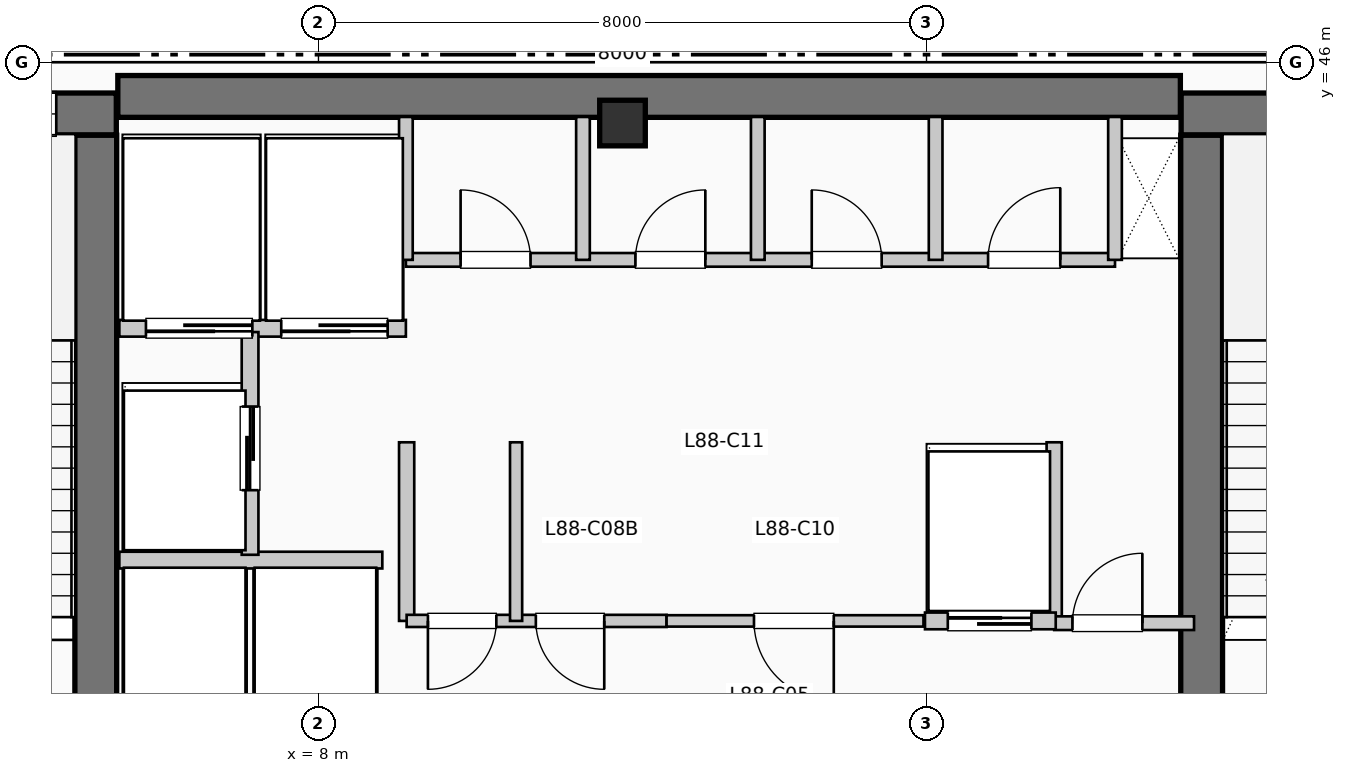
"""IFC4 building model, lengths in metres.
Left out: names, types, materials, properties, quantities, classifications, styles, units other than length and angle.
Written with IfcOpenShell. Run it as: python <this file> out.ifc"""

import sys

from ifc_helpers import new_model, si_unit, direction, frame, frame_2d, origin, origin_2d, place, context, subcontext, project, spatial, rectangle, extrude, element, fill, save


model = new_model("IFC4")
c1 = context("Model", 3, precision=1e-05, world=origin(), true_north=direction((0.0, 1.0)))
c2 = subcontext(c1, "Body", "Model", "MODEL_VIEW")
j1 = project(units=[si_unit("LENGTHUNIT", "METRE"), si_unit("PLANEANGLEUNIT", "RADIAN")], contexts=[c1])
p1 = place(None, origin())
s1 = spatial("IfcSite", under=j1, at=p1, CompositionType="ELEMENT")
p2 = place(p1, origin())
s2 = spatial("IfcBuilding", under=s1, at=p2, CompositionType="ELEMENT")
p3 = place(p2, frame((0.0, 0.0, 361.35)))
s3 = spatial("IfcBuildingStorey", under=s2, at=p3, CompositionType="ELEMENT", Elevation=361.35)
p4 = place(p3, frame((5.36, 45.55, 0.0), z_axis=(0.0, 0.0, 1.0), x_axis=(1.0, 0.0, 0.0)))
e1 = element("IfcWall", 1, at=p4, inside=s3, PredefinedType="SHEAR", context=c2, shape_type="SweptSolid", body=[
    extrude(rectangle(XDim=13.98, YDim=0.55, at=frame_2d((6.99, 0.0))), origin(), (0.0, 0.0, 1.0), 4.62),
])
p5 = place(p3, frame((5.07, 37.15, 0.0), z_axis=(0.0, 0.0, 1.0), x_axis=(0.0, 1.0, 0.0)))
e2 = element("IfcWall", 2, at=p5, inside=s3, PredefinedType="SHEAR", context=c2, shape_type="SweptSolid", body=[
    extrude(rectangle(XDim=7.89, YDim=0.55, at=frame_2d((3.945, 0.0))), origin(), (0.0, 0.0, 1.0), 4.62),
])
p6 = place(p3, frame((1.1, 45.32, 0.0), z_axis=(0.0, 0.0, 1.0), x_axis=(1.0, 0.0, 0.0)))
e3 = element("IfcWall", 3, at=p6, inside=s3, PredefinedType="SHEAR", context=c2, shape_type="SweptSolid", body=[
    extrude(rectangle(XDim=4.24, YDim=0.55, at=frame_2d((2.12, 0.0))), origin(), (0.0, 0.0, 1.0), 4.62),
])
p7 = place(p6, frame((2.05, 0.0, 1.05)))
e4 = element("IfcOpeningElement", 4, at=p7, cuts=e3, PredefinedType="OPENING", context=c2, shape_type="SweptSolid", body=[
    extrude(rectangle(XDim=1.4, YDim=1.8, at=frame_2d((0.7, 0.9))), frame((0.0, 0.285, 0.0), z_axis=(0.0, -1.0, 0.0), x_axis=(1.0, 0.0, 0.0)), (0.0, 0.0, 1.0), 0.57),
])
p8 = place(p3, frame((19.62, 37.15, 0.0), z_axis=(0.0, 0.0, 1.0), x_axis=(0.0, 1.0, 0.0)))
e5 = element("IfcWall", 5, at=p8, inside=s3, PredefinedType="SHEAR", context=c2, shape_type="SweptSolid", body=[
    extrude(rectangle(XDim=7.89, YDim=0.55, at=frame_2d((3.945, 0.0))), origin(), (0.0, 0.0, 1.0), 4.62),
])
p9 = place(p3, frame((19.35, 45.32, 0.0), z_axis=(0.0, 0.0, 1.0), x_axis=(1.0, 0.0, 0.0)))
e6 = element("IfcWall", 6, at=p9, inside=s3, PredefinedType="SHEAR", context=c2, shape_type="SweptSolid", body=[
    extrude(rectangle(XDim=3.69, YDim=0.55, at=frame_2d((1.845, 0.0))), origin(), (0.0, 0.0, 1.0), 4.62),
])
p10 = place(p9, frame((1.15, 0.0, 1.05)))
e7 = element("IfcOpeningElement", 7, at=p10, cuts=e6, PredefinedType="OPENING", context=c2, shape_type="SweptSolid", body=[
    extrude(rectangle(XDim=1.4, YDim=1.8, at=frame_2d((0.7, 0.9))), frame((0.0, 0.285, 0.0), z_axis=(0.0, -1.0, 0.0), x_axis=(1.0, 0.0, 0.0)), (0.0, 0.0, 1.0), 0.57),
])
p11 = place(p3, frame((12.0, 45.2, 0.0), z_axis=(0.0, 0.0, 1.0), x_axis=(1.0, 0.0, 0.0)))
e8 = element("IfcColumn", 8, at=p11, inside=s3, PredefinedType="COLUMN", context=c2, shape_type="SweptSolid", body=[
    extrude(rectangle(XDim=0.6, YDim=0.6, at=origin_2d()), origin(), (0.0, 0.0, 1.0), 4.62),
])
p12 = place(p3, frame((5.38, 39.45, 0.0), z_axis=(0.0, 0.0, 1.0), x_axis=(1.0, 0.0, 0.0)))
e9 = element("IfcWall", 9, at=p12, inside=s3, PredefinedType="PARTITIONING", context=c2, shape_type="SweptSolid", body=[
    extrude(rectangle(XDim=3.46, YDim=0.22, at=frame_2d((1.73, 0.0))), origin(), (0.0, 0.0, 1.0), 4.27),
])
p13 = place(p3, frame((5.38, 42.5, 0.0), z_axis=(0.0, 0.0, 1.0), x_axis=(1.0, 0.0, 0.0)))
e10 = element("IfcWall", 10, at=p13, inside=s3, PredefinedType="PARTITIONING", context=c2, shape_type="SweptSolid", body=[
    extrude(rectangle(XDim=3.77, YDim=0.22, at=frame_2d((1.885, 0.0))), origin(), (0.0, 0.0, 1.0), 4.27),
])
p14 = place(p13, frame((1.75, 0.0, 0.0), z_axis=(0.0, 0.0, 1.0), x_axis=(-1.0, 0.0, 0.0)))
e11 = element("IfcOpeningElement", 11, at=p14, cuts=e10, PredefinedType="OPENING", context=c2, shape_type="SweptSolid", body=[
    extrude(rectangle(XDim=1.4, YDim=2.2, at=frame_2d((0.7, 1.1))), frame((0.0, 0.12, 0.0), z_axis=(0.0, -1.0, 0.0), x_axis=(1.0, 0.0, 0.0)), (0.0, 0.0, 1.0), 0.24),
])
p15 = place(p13, frame((3.53, 0.0, 0.0), z_axis=(0.0, 0.0, 1.0), x_axis=(-1.0, 0.0, 0.0)))
e12 = element("IfcOpeningElement", 12, at=p15, cuts=e10, PredefinedType="OPENING", context=c2, shape_type="SweptSolid", body=[
    extrude(rectangle(XDim=1.4, YDim=2.2, at=frame_2d((0.7, 1.1))), frame((0.0, 0.12, 0.0), z_axis=(0.0, -1.0, 0.0), x_axis=(1.0, 0.0, 0.0)), (0.0, 0.0, 1.0), 0.24),
])
p16 = place(p3, frame((7.1, 39.52, 0.0), z_axis=(0.0, 0.0, 1.0), x_axis=(0.0, 1.0, 0.0)))
e13 = element("IfcWall", 13, at=p16, inside=s3, PredefinedType="PARTITIONING", context=c2, shape_type="SweptSolid", body=[
    extrude(rectangle(XDim=2.93, YDim=0.22, at=frame_2d((1.465, 0.0))), origin(), (0.0, 0.0, 1.0), 4.27),
])
p17 = place(p16, frame((0.85, 0.0, 0.0)))
e14 = element("IfcOpeningElement", 14, at=p17, cuts=e13, PredefinedType="OPENING", context=c2, shape_type="SweptSolid", body=[
    extrude(rectangle(XDim=1.1, YDim=2.2, at=frame_2d((0.55, 1.1))), frame((0.0, 0.12, 0.0), z_axis=(0.0, -1.0, 0.0), x_axis=(1.0, 0.0, 0.0)), (0.0, 0.0, 1.0), 0.24),
])
for number, where, z_axis, x_axis in (
    (15, (9.16, 38.65, 0.0), (0.0, 0.0, 1.0), (0.0, 1.0, 0.0)),
    (16, (17.68, 38.65, 0.0), (0.0, 0.0, 1.0), (0.0, 1.0, 0.0)),
):
    element("IfcWall", number, at=place(p3, frame(where, z_axis=z_axis, x_axis=x_axis)), inside=s3, PredefinedType="PARTITIONING", context=c2, shape_type="SweptSolid", body=[
        extrude(rectangle(XDim=2.35, YDim=0.2, at=frame_2d((1.175, 0.0))), origin(), (0.0, 0.0, 1.0), 4.27),
    ])
p18 = place(p3, frame((17.68, 38.62, 0.0), z_axis=(0.0, 0.0, 1.0), x_axis=(1.0, 0.0, 0.0)))
e17 = element("IfcWall", 17, at=p18, inside=s3, PredefinedType="PARTITIONING", context=c2, shape_type="SweptSolid", body=[
    extrude(rectangle(XDim=1.84, YDim=0.18, at=frame_2d((0.92, 0.0))), origin(), (0.0, 0.0, 1.0), 4.27),
])
p19 = place(p18, frame((0.24, 0.0, 0.0)))
e18 = element("IfcOpeningElement", 18, at=p19, cuts=e17, PredefinedType="OPENING", context=c2, shape_type="SweptSolid", body=[
    extrude(rectangle(XDim=0.92, YDim=2.1, at=frame_2d((0.46, 1.05))), frame((0.0, 0.1, 0.0), z_axis=(0.0, -1.0, 0.0), x_axis=(1.0, 0.0, 0.0)), (0.0, 0.0, 1.0), 0.2),
])
p20 = place(p3, frame((9.16, 38.65, 0.0), z_axis=(0.0, 0.0, 1.0), x_axis=(1.0, 0.0, 0.0)))
e19 = element("IfcWall", 19, at=p20, inside=s3, PredefinedType="PARTITIONING", context=c2, shape_type="SweptSolid", body=[
    extrude(rectangle(XDim=3.42, YDim=0.16, at=frame_2d((1.71, 0.0))), origin(), (0.0, 0.0, 1.0), 4.27),
])
p21 = place(p20, frame((1.18, 0.0, 0.0), z_axis=(0.0, 0.0, 1.0), x_axis=(-1.0, 0.0, 0.0)))
e20 = element("IfcOpeningElement", 20, at=p21, cuts=e19, PredefinedType="OPENING", context=c2, shape_type="SweptSolid", body=[
    extrude(rectangle(XDim=0.9, YDim=2.15, at=frame_2d((0.45, 1.075))), frame((0.0, 0.09, 0.0), z_axis=(0.0, -1.0, 0.0), x_axis=(1.0, 0.0, 0.0)), (0.0, 0.0, 1.0), 0.18),
])
p22 = place(p20, frame((2.6, 0.0, 0.0), z_axis=(0.0, 0.0, 1.0), x_axis=(-1.0, 0.0, 0.0)))
e21 = element("IfcOpeningElement", 21, at=p22, cuts=e19, PredefinedType="OPENING", context=c2, shape_type="SweptSolid", body=[
    extrude(rectangle(XDim=0.9, YDim=2.15, at=frame_2d((0.45, 1.075))), frame((0.0, 0.09, 0.0), z_axis=(0.0, -1.0, 0.0), x_axis=(1.0, 0.0, 0.0)), (0.0, 0.0, 1.0), 0.18),
])
p23 = place(p3, frame((10.6, 38.65, 0.0), z_axis=(0.0, 0.0, 1.0), x_axis=(0.0, 1.0, 0.0)))
e22 = element("IfcWall", 22, at=p23, inside=s3, PredefinedType="PARTITIONING", context=c2, shape_type="SweptSolid", body=[
    extrude(rectangle(XDim=2.35, YDim=0.16, at=frame_2d((1.175, 0.0))), origin(), (0.0, 0.0, 1.0), 4.27),
])
p24 = place(p3, frame((12.58, 38.65, 0.0), z_axis=(0.0, 0.0, 1.0), x_axis=(1.0, 0.0, 0.0)))
e23 = element("IfcWall", 23, at=p24, inside=s3, PredefinedType="PARTITIONING", context=c2, shape_type="SweptSolid", body=[
    extrude(rectangle(XDim=3.38, YDim=0.15, at=frame_2d((1.69, 0.0))), origin(), (0.0, 0.0, 1.0), 4.27),
])
p25 = place(p24, frame((2.2, 0.0, 0.0), z_axis=(0.0, 0.0, 1.0), x_axis=(-1.0, 0.0, 0.0)))
e24 = element("IfcOpeningElement", 24, at=p25, cuts=e23, PredefinedType="OPENING", context=c2, shape_type="SweptSolid", body=[
    extrude(rectangle(XDim=1.05, YDim=2.15, at=frame_2d((0.525, 1.075))), frame((0.0, 0.085, 0.0), z_axis=(0.0, -1.0, 0.0), x_axis=(1.0, 0.0, 0.0)), (0.0, 0.0, 1.0), 0.17),
])
p26 = place(p3, frame((15.98, 38.65, 0.0), z_axis=(0.0, 0.0, 1.0), x_axis=(1.0, 0.0, 0.0)))
e25 = element("IfcWall", 25, at=p26, inside=s3, PredefinedType="PARTITIONING", context=c2, shape_type="SweptSolid", body=[
    extrude(rectangle(XDim=1.72, YDim=0.22, at=frame_2d((0.86, 0.0))), origin(), (0.0, 0.0, 1.0), 4.27),
])
p27 = place(p26, frame((0.3, 0.0, 0.0)))
e26 = element("IfcOpeningElement", 26, at=p27, cuts=e25, PredefinedType="OPENING", context=c2, shape_type="SweptSolid", body=[
    extrude(rectangle(XDim=1.1, YDim=2.2, at=frame_2d((0.55, 1.1))), frame((0.0, 0.12, 0.0), z_axis=(0.0, -1.0, 0.0), x_axis=(1.0, 0.0, 0.0)), (0.0, 0.0, 1.0), 0.24),
])
p28 = place(p3, frame((9.15, 43.4, 0.0), z_axis=(0.0, 0.0, 1.0), x_axis=(1.0, 0.0, 0.0)))
e27 = element("IfcWall", 27, at=p28, inside=s3, PredefinedType="PLUMBINGWALL", context=c2, shape_type="SweptSolid", body=[
    extrude(rectangle(XDim=9.33, YDim=0.18, at=frame_2d((4.665, 0.0))), origin(), (0.0, 0.0, 1.0), 4.27),
])
p29 = place(p28, frame((0.72, 0.0, 0.0)))
e28 = element("IfcOpeningElement", 28, at=p29, cuts=e27, PredefinedType="OPENING", context=c2, shape_type="SweptSolid", body=[
    extrude(rectangle(XDim=0.92, YDim=2.1, at=frame_2d((0.46, 1.05))), frame((0.0, 0.1, 0.0), z_axis=(0.0, -1.0, 0.0), x_axis=(1.0, 0.0, 0.0)), (0.0, 0.0, 1.0), 0.2),
])
p30 = place(p28, frame((3.02, 0.0, 0.0)))
e29 = element("IfcOpeningElement", 29, at=p30, cuts=e27, PredefinedType="OPENING", context=c2, shape_type="SweptSolid", body=[
    extrude(rectangle(XDim=0.92, YDim=2.1, at=frame_2d((0.46, 1.05))), frame((0.0, 0.1, 0.0), z_axis=(0.0, -1.0, 0.0), x_axis=(1.0, 0.0, 0.0)), (0.0, 0.0, 1.0), 0.2),
])
p31 = place(p28, frame((5.34, 0.0, 0.0)))
e30 = element("IfcOpeningElement", 30, at=p31, cuts=e27, PredefinedType="OPENING", context=c2, shape_type="SweptSolid", body=[
    extrude(rectangle(XDim=0.92, YDim=2.1, at=frame_2d((0.46, 1.05))), frame((0.0, 0.1, 0.0), z_axis=(0.0, -1.0, 0.0), x_axis=(1.0, 0.0, 0.0)), (0.0, 0.0, 1.0), 0.2),
])
p32 = place(p28, frame((7.66, 0.0, 0.0)))
e31 = element("IfcOpeningElement", 31, at=p32, cuts=e27, PredefinedType="OPENING", context=c2, shape_type="SweptSolid", body=[
    extrude(rectangle(XDim=0.95, YDim=2.1, at=frame_2d((0.475, 1.05))), frame((0.0, 0.1, 0.0), z_axis=(0.0, -1.0, 0.0), x_axis=(1.0, 0.0, 0.0)), (0.0, 0.0, 1.0), 0.2),
])
for number, where, z_axis, x_axis in (
    (32, (9.15, 43.4, 0.0), (0.0, 0.0, 1.0), (0.0, 1.0, 0.0)),
    (33, (18.48, 43.4, 0.0), (0.0, 0.0, 1.0), (0.0, 1.0, 0.0)),
    (34, (11.48, 43.4, 0.0), (0.0, 0.0, 1.0), (0.0, 1.0, 0.0)),
    (35, (13.78, 43.4, 0.0), (0.0, 0.0, 1.0), (0.0, 1.0, 0.0)),
    (36, (16.12, 43.4, 0.0), (0.0, 0.0, 1.0), (0.0, 1.0, 0.0)),
):
    element("IfcWall", number, at=place(p3, frame(where, z_axis=z_axis, x_axis=x_axis)), inside=s3, PredefinedType="PLUMBINGWALL", context=c2, shape_type="SweptSolid", body=[
        extrude(rectangle(XDim=1.88, YDim=0.18, at=frame_2d((0.94, 0.0))), origin(), (0.0, 0.0, 1.0), 4.27),
    ])
p33 = place(p7, origin())
e37 = element("IfcWindow", 37, at=p33, inside=s3, PartitioningType="SINGLE_PANEL", PredefinedType="WINDOW", context=c2, shape_type="SweptSolid", body=[
    extrude(rectangle(XDim=1.4, YDim=1.8, at=frame_2d((0.7, 0.9))), frame((0.0, 0.03, 0.0), z_axis=(0.0, -1.0, 0.0), x_axis=(1.0, 0.0, 0.0)), (0.0, 0.0, 1.0), 0.06),
])
fill(e4, e37)
p34 = place(p14, origin())
e38 = element("IfcDoor", 38, at=p34, inside=s3, OperationType="SLIDING_TO_LEFT", PredefinedType="DOOR", context=c2, shape_type="SweptSolid", body=[
    extrude(rectangle(XDim=1.4, YDim=2.2, at=frame_2d((0.7, 1.1))), frame((0.0, 0.025, 0.0), z_axis=(0.0, -1.0, 0.0), x_axis=(1.0, 0.0, 0.0)), (0.0, 0.0, 1.0), 0.05),
])
fill(e11, e38)
p35 = place(p15, origin())
e39 = element("IfcDoor", 39, at=p35, inside=s3, OperationType="SLIDING_TO_LEFT", PredefinedType="DOOR", context=c2, shape_type="SweptSolid", body=[
    extrude(rectangle(XDim=1.4, YDim=2.2, at=frame_2d((0.7, 1.1))), frame((0.0, 0.025, 0.0), z_axis=(0.0, -1.0, 0.0), x_axis=(1.0, 0.0, 0.0)), (0.0, 0.0, 1.0), 0.05),
])
fill(e12, e39)
p36 = place(p17, origin())
e40 = element("IfcDoor", 40, at=p36, inside=s3, OperationType="SLIDING_TO_LEFT", PredefinedType="DOOR", context=c2, shape_type="SweptSolid", body=[
    extrude(rectangle(XDim=1.1, YDim=2.2, at=frame_2d((0.55, 1.1))), frame((0.0, 0.025, 0.0), z_axis=(0.0, -1.0, 0.0), x_axis=(1.0, 0.0, 0.0)), (0.0, 0.0, 1.0), 0.05),
])
fill(e14, e40)
p37 = place(p19, origin())
e41 = element("IfcDoor", 41, at=p37, inside=s3, OperationType="SINGLE_SWING_RIGHT", PredefinedType="DOOR", context=c2, shape_type="SweptSolid", body=[
    extrude(rectangle(XDim=0.92, YDim=2.1, at=frame_2d((0.46, 1.05))), frame((0.0, 0.025, 0.0), z_axis=(0.0, -1.0, 0.0), x_axis=(1.0, 0.0, 0.0)), (0.0, 0.0, 1.0), 0.05),
])
fill(e18, e41)
p38 = place(p21, origin())
e42 = element("IfcDoor", 42, at=p38, inside=s3, OperationType="SINGLE_SWING_LEFT", PredefinedType="DOOR", context=c2, shape_type="SweptSolid", body=[
    extrude(rectangle(XDim=0.9, YDim=2.15, at=frame_2d((0.45, 1.075))), frame((0.0, 0.025, 0.0), z_axis=(0.0, -1.0, 0.0), x_axis=(1.0, 0.0, 0.0)), (0.0, 0.0, 1.0), 0.05),
])
fill(e20, e42)
p39 = place(p22, origin())
e43 = element("IfcDoor", 43, at=p39, inside=s3, OperationType="SINGLE_SWING_RIGHT", PredefinedType="DOOR", context=c2, shape_type="SweptSolid", body=[
    extrude(rectangle(XDim=0.9, YDim=2.15, at=frame_2d((0.45, 1.075))), frame((0.0, 0.025, 0.0), z_axis=(0.0, -1.0, 0.0), x_axis=(1.0, 0.0, 0.0)), (0.0, 0.0, 1.0), 0.05),
])
fill(e21, e43)
p40 = place(p25, origin())
e44 = element("IfcDoor", 44, at=p40, inside=s3, OperationType="SINGLE_SWING_RIGHT", PredefinedType="DOOR", context=c2, shape_type="SweptSolid", body=[
    extrude(rectangle(XDim=1.05, YDim=2.15, at=frame_2d((0.525, 1.075))), frame((0.0, 0.025, 0.0), z_axis=(0.0, -1.0, 0.0), x_axis=(1.0, 0.0, 0.0)), (0.0, 0.0, 1.0), 0.05),
])
fill(e24, e44)
p41 = place(p27, origin())
e45 = element("IfcDoor", 45, at=p41, inside=s3, OperationType="SLIDING_TO_LEFT", PredefinedType="DOOR", context=c2, shape_type="SweptSolid", body=[
    extrude(rectangle(XDim=1.1, YDim=2.2, at=frame_2d((0.55, 1.1))), frame((0.0, 0.025, 0.0), z_axis=(0.0, -1.0, 0.0), x_axis=(1.0, 0.0, 0.0)), (0.0, 0.0, 1.0), 0.05),
])
fill(e26, e45)
p42 = place(p29, origin())
e46 = element("IfcDoor", 46, at=p42, inside=s3, OperationType="SINGLE_SWING_LEFT", PredefinedType="DOOR", context=c2, shape_type="SweptSolid", body=[
    extrude(rectangle(XDim=0.92, YDim=2.1, at=frame_2d((0.46, 1.05))), frame((0.0, 0.025, 0.0), z_axis=(0.0, -1.0, 0.0), x_axis=(1.0, 0.0, 0.0)), (0.0, 0.0, 1.0), 0.05),
])
fill(e28, e46)
p43 = place(p30, origin())
e47 = element("IfcDoor", 47, at=p43, inside=s3, OperationType="SINGLE_SWING_RIGHT", PredefinedType="DOOR", context=c2, shape_type="SweptSolid", body=[
    extrude(rectangle(XDim=0.92, YDim=2.1, at=frame_2d((0.46, 1.05))), frame((0.0, 0.025, 0.0), z_axis=(0.0, -1.0, 0.0), x_axis=(1.0, 0.0, 0.0)), (0.0, 0.0, 1.0), 0.05),
])
fill(e29, e47)
p44 = place(p31, origin())
e48 = element("IfcDoor", 48, at=p44, inside=s3, OperationType="SINGLE_SWING_LEFT", PredefinedType="DOOR", context=c2, shape_type="SweptSolid", body=[
    extrude(rectangle(XDim=0.92, YDim=2.1, at=frame_2d((0.46, 1.05))), frame((0.0, 0.025, 0.0), z_axis=(0.0, -1.0, 0.0), x_axis=(1.0, 0.0, 0.0)), (0.0, 0.0, 1.0), 0.05),
])
fill(e30, e48)
p45 = place(p32, origin())
e49 = element("IfcDoor", 49, at=p45, inside=s3, OperationType="SINGLE_SWING_RIGHT", PredefinedType="DOOR", context=c2, shape_type="SweptSolid", body=[
    extrude(rectangle(XDim=0.95, YDim=2.1, at=frame_2d((0.475, 1.05))), frame((0.0, 0.025, 0.0), z_axis=(0.0, -1.0, 0.0), x_axis=(1.0, 0.0, 0.0)), (0.0, 0.0, 1.0), 0.05),
])
fill(e31, e49)
save(model, sys.argv[1])
